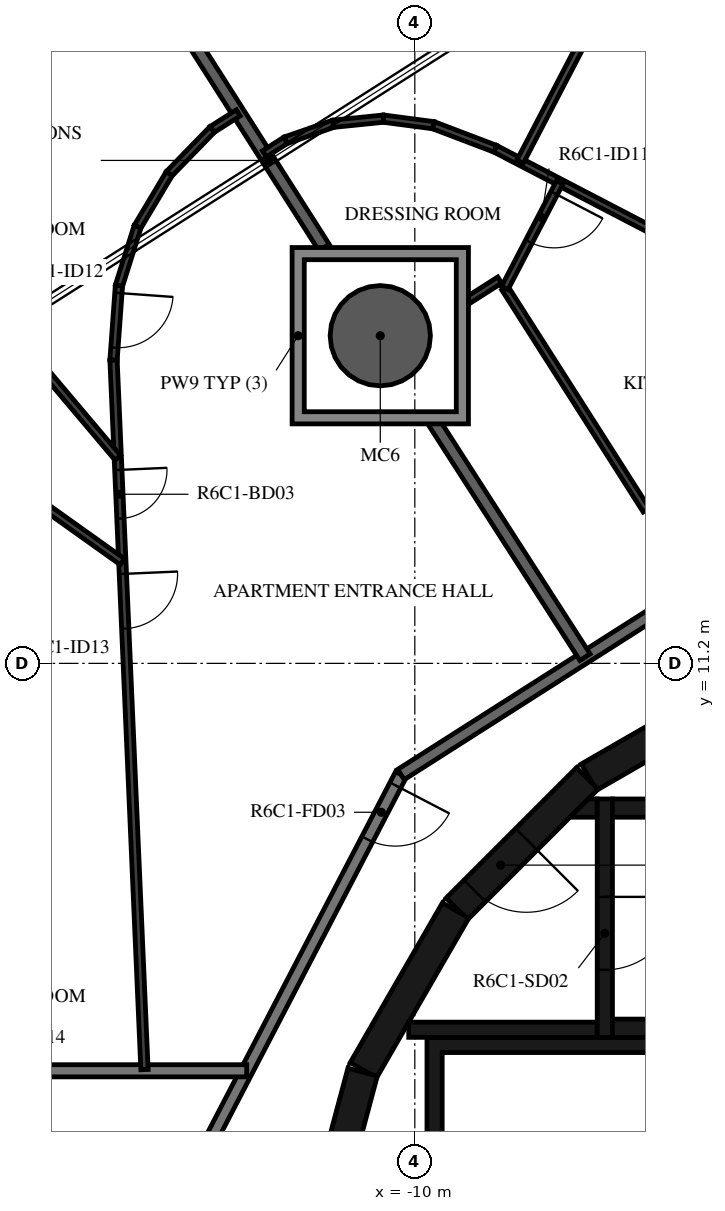
"""IFC4 building model, lengths in metres.
Left out: names, types, materials, properties, quantities, classifications, styles, units other than length and angle.
Written with IfcOpenShell. Run it as: python <this file> out.ifc"""

import sys

from ifc_helpers import new_model, si_unit, direction, frame, frame_2d, origin, origin_2d, place, context, subcontext, project, spatial, polyline, rectangle, hollow_circle, outline, extrude, element, fill, save


model = new_model("IFC4")
c1 = context("Model", 3, precision=1e-05, world=origin(), true_north=direction((0.0, 1.0)))
c2 = subcontext(c1, "Body", "Model", "MODEL_VIEW")
j1 = project(units=[si_unit("LENGTHUNIT", "METRE"), si_unit("PLANEANGLEUNIT", "RADIAN")], contexts=[c1])
p1 = place(None, origin())
s1 = spatial("IfcSite", under=j1, at=p1, CompositionType="ELEMENT")
p2 = place(p1, origin())
s2 = spatial("IfcBuilding", under=s1, at=p2, CompositionType="ELEMENT")
p3 = place(p2, frame((0.0, 0.0, 251.2)))
s3 = spatial("IfcBuildingStorey", under=s2, at=p3, CompositionType="ELEMENT", Elevation=251.2)
p4 = place(p3, frame((-10.568, 16.588, -0.38), z_axis=(0.0, 0.0, 1.0), x_axis=(1.0, 0.0, 0.0)))
e1 = element("IfcColumn", 1, at=p4, inside=s3, PredefinedType="COLUMN", context=c2, shape_type="SweptSolid", body=[
    extrude(hollow_circle(Radius=0.825, WallThickness=0.04, at=origin_2d()), origin(), (0.0, 0.0, 1.0), 3.5),
])
p5 = place(p3, frame((-4.51, 10.845, 0.0), z_axis=(0.0, 0.0, 1.0), x_axis=(-0.865975092491, -0.500087131594, 0.0)))
e2 = element("IfcWall", 2, at=p5, inside=s3, PredefinedType="SHEAR", context=c2, shape_type="SweptSolid", body=[
    extrude(rectangle(XDim=3.033, YDim=0.5, at=frame_2d((1.516, 0.0))), origin(), (0.0, 0.0, 1.0), 3.12),
])
p6 = place(p3, frame((-7.164, 9.308, 0.0), z_axis=(0.0, 0.0, 1.0), x_axis=(-0.707106781187, -0.707106781187, 0.0)))
e3 = element("IfcWall", 3, at=p6, inside=s3, PredefinedType="SHEAR", context=c2, shape_type="SweptSolid", body=[
    extrude(rectangle(XDim=3.032, YDim=0.5, at=frame_2d((1.516, 0.0))), origin(), (0.0, 0.0, 1.0), 3.12),
])
p7 = place(p6, frame((1.416, 0.0, 0.0)))
e4 = element("IfcOpeningElement", 4, at=p7, cuts=e3, PredefinedType="OPENING", context=c2, shape_type="SweptSolid", body=[
    extrude(rectangle(XDim=1.2, YDim=2.1, at=frame_2d((0.6, 1.05))), frame((0.0, 0.26, 0.0), z_axis=(0.0, -1.0, 0.0), x_axis=(1.0, 0.0, 0.0)), (0.0, 0.0, 1.0), 0.52),
])
for number, where, z_axis, x_axis in (
    (5, (-9.329, 7.137, 0.0), (0.0, 0.0, 1.0), (-0.5, -0.866, 0.0)),
    (6, (-10.858, 4.479, 0.0), (0.0, 0.0, 1.0), (-0.259, -0.966, 0.0)),
):
    element("IfcWall", number, at=place(p3, frame(where, z_axis=z_axis, x_axis=x_axis)), inside=s3, PredefinedType="SHEAR", context=c2, shape_type="SweptSolid", body=[
        extrude(rectangle(XDim=3.033, YDim=0.5, at=frame_2d((1.516, 0.0))), origin(), (0.0, 0.0, 1.0), 3.12),
    ])
for number, where, z_axis, x_axis in (
    (7, (-6.75, 5.2, 0.0), (0.0, 0.0, 1.0), (1.0, 0.0, 0.0)),
    (8, (-6.75, 8.82, 0.0), (0.0, 0.0, 1.0), (1.0, 0.0, 0.0)),
):
    element("IfcWall", number, at=place(p3, frame(where, z_axis=z_axis, x_axis=x_axis)), inside=s3, PredefinedType="SHEAR", context=c2, shape_type="SweptSolid", body=[
        extrude(rectangle(XDim=6.75, YDim=0.3, at=frame_2d((3.375, 0.0))), origin(), (0.0, 0.0, 1.0), 3.12),
    ])
p8 = place(p3, frame((-6.875, 8.97, 0.0), z_axis=(0.0, 0.0, 1.0), x_axis=(0.0, -1.0, 0.0)))
e9 = element("IfcWall", 9, at=p8, inside=s3, PredefinedType="SHEAR", context=c2, shape_type="SweptSolid", body=[
    extrude(rectangle(XDim=3.92, YDim=0.25, at=frame_2d((1.96, 0.0))), origin(), (0.0, 0.0, 1.0), 3.12),
])
p9 = place(p8, frame((1.61, 0.0, 0.0)))
e10 = element("IfcOpeningElement", 10, at=p9, cuts=e9, PredefinedType="OPENING", context=c2, shape_type="SweptSolid", body=[
    extrude(rectangle(XDim=1.2, YDim=2.1, at=frame_2d((0.6, 1.05))), frame((0.0, 0.135, 0.0), z_axis=(0.0, -1.0, 0.0), x_axis=(1.0, 0.0, 0.0)), (0.0, 0.0, 1.0), 0.27),
])
p10 = place(p3, frame((-7.0, 5.175, 0.0), z_axis=(0.0, 0.0, 1.0), x_axis=(-1.0, 0.0, 0.0)))
e11 = element("IfcWall", 11, at=p10, inside=s3, PredefinedType="SHEAR", context=c2, shape_type="SweptSolid", body=[
    extrude(rectangle(XDim=3.1, YDim=0.25, at=frame_2d((1.55, 0.0))), origin(), (0.0, 0.0, 1.0), 3.12),
])
p11 = place(p3, origin())
e12 = element("IfcWall", 12, at=p11, inside=s3, PredefinedType="SHEAR", context=c2, shape_type="SweptSolid", body=[
    extrude(outline(polyline([(-7.148, 8.97), (-7.0, 8.97), (-7.0, 8.67), (-7.448, 8.67), (-7.148, 8.97)])), origin(), (0.0, 0.0, 1.0), 3.12),
])
p12 = place(p3, origin())
e13 = element("IfcWall", 13, at=p12, inside=s3, PredefinedType="SHEAR", context=c2, shape_type="SweptSolid", body=[
    extrude(outline(polyline([(-9.55, 4.8), (-1.2, 4.8), (-1.2, 1.9), (-0.95, 1.9), (-0.95, 4.8), (0.95, 4.8), (0.95, 1.9), (1.2, 1.9), (1.2, 4.8), (3.1, 4.8), (3.1, 1.9), (3.35, 1.9), (3.35, 4.8), (5.25, 4.8), (5.25, 1.9), (5.5, 1.9), (5.5, 4.8), (7.4, 4.8), (7.4, 1.9), (7.65, 1.9), (7.65, 4.8), (9.55, 4.8), (9.55, 1.9), (9.8, 1.9), (9.8, 4.8), (9.8, 5.05), (-9.8, 5.05), (-9.8, 4.8), (-9.8, 1.9), (-9.55, 1.9), (-9.55, 4.8)])), origin(), (0.0, 0.0, 1.0), 3.12),
])
p13 = place(p3, frame((-10.228, 9.372, 0.0), z_axis=(0.0, 0.0, 1.0), x_axis=(-0.461759464021, -0.887005184532, 0.0)))
e14 = element("IfcWall", 14, at=p13, inside=s3, PredefinedType="STANDARD", context=c2, shape_type="SweptSolid", body=[
    extrude(rectangle(XDim=7.181, YDim=0.2, at=frame_2d((3.591, 0.0))), origin(), (0.0, 0.0, 1.0), 3.12),
])
p14 = place(p13, frame((0.2, 0.0, 0.0)))
e15 = element("IfcOpeningElement", 15, at=p14, cuts=e14, PredefinedType="OPENING", context=c2, shape_type="SweptSolid", body=[
    extrude(rectangle(XDim=1.0, YDim=2.1, at=frame_2d((0.5, 1.05))), frame((0.0, 0.11, 0.0), z_axis=(0.0, -1.0, 0.0), x_axis=(1.0, 0.0, 0.0)), (0.0, 0.0, 1.0), 0.22),
])
p15 = place(p3, frame((-4.172, 13.231, 0.0), z_axis=(0.0, 0.0, 1.0), x_axis=(-0.843388394728, -0.537304397561, 0.0)))
e16 = element("IfcWall", 16, at=p15, inside=s3, PredefinedType="STANDARD", context=c2, shape_type="SweptSolid", body=[
    extrude(rectangle(XDim=7.181, YDim=0.2, at=frame_2d((3.59, 0.0))), origin(), (0.0, 0.0, 1.0), 3.12),
])
p16 = place(p3, frame((-12.764, 4.5, 0.0), z_axis=(0.0, 0.0, 1.0), x_axis=(-1.0, 0.0, 0.0)))
e17 = element("IfcWall", 17, at=p16, inside=s3, PredefinedType="STANDARD", context=c2, shape_type="SweptSolid", body=[
    extrude(rectangle(XDim=4.086, YDim=0.2, at=frame_2d((2.043, 0.0))), origin(), (0.0, 0.0, 1.0), 3.12),
])
p17 = place(p3, frame((-9.69, 15.171, 0.0), z_axis=(0.0, 0.0, 1.0), x_axis=(0.540961372678, -0.841047438181, 0.0)))
e18 = element("IfcWall", 18, at=p17, inside=s3, PredefinedType="STANDARD", context=c2, shape_type="SweptSolid", body=[
    extrude(rectangle(XDim=4.602, YDim=0.2, at=frame_2d((2.301, 0.0))), origin(), (0.0, 0.0, 1.0), 3.12),
])
p18 = place(p3, frame((-14.837, 23.29, 0.0), z_axis=(0.0, 0.0, 1.0), x_axis=(0.537316863221, -0.843380452998, 0.0)))
e19 = element("IfcWall", 19, at=p18, inside=s3, PredefinedType="STANDARD", context=c2, shape_type="SweptSolid", body=[
    extrude(rectangle(XDim=6.227, YDim=0.2, at=frame_2d((3.113, 0.0))), origin(), (0.0, 0.0, 1.0), 3.12),
])
p19 = place(p3, frame((-4.888, 14.553, 0.0), z_axis=(0.0, 0.0, 1.0), x_axis=(-0.843349608892, -0.537365273517, 0.0)))
e20 = element("IfcWall", 20, at=p19, inside=s3, PredefinedType="PARTITIONING", context=c2, shape_type="SweptSolid", body=[
    extrude(rectangle(XDim=1.548, YDim=0.12, at=frame_2d((0.774, 0.0))), origin(), (0.0, 0.0, 1.0), 3.12),
])
p20 = place(p19, frame((0.2, 0.0, 0.0)))
e21 = element("IfcOpeningElement", 21, at=p20, cuts=e20, PredefinedType="OPENING", context=c2, shape_type="SweptSolid", body=[
    extrude(rectangle(XDim=0.9, YDim=2.1, at=frame_2d((0.45, 1.05))), frame((0.0, 0.07, 0.0), z_axis=(0.0, -1.0, 0.0), x_axis=(1.0, 0.0, 0.0)), (0.0, 0.0, 1.0), 0.14),
])
p21 = place(p3, frame((-6.194, 13.721, 0.0), z_axis=(0.0, 0.0, 1.0), x_axis=(-0.537316807294, 0.843380488629, 0.0)))
e22 = element("IfcWall", 22, at=p21, inside=s3, PredefinedType="PARTITIONING", context=c2, shape_type="SweptSolid", body=[
    extrude(rectangle(XDim=4.331, YDim=0.12, at=frame_2d((2.165, 0.0))), origin(), (0.0, 0.0, 1.0), 3.12),
])
p22 = place(p3, frame((-8.604, 17.504, 0.0), z_axis=(0.0, 0.0, 1.0), x_axis=(-0.843265746233, -0.537496866251, 0.0)))
e23 = element("IfcWall", 23, at=p22, inside=s3, PredefinedType="PARTITIONING", context=c2, shape_type="SweptSolid", body=[
    extrude(rectangle(XDim=0.61, YDim=0.12, at=frame_2d((0.305, 0.0))), origin(), (0.0, 0.0, 1.0), 3.12),
])
p23 = place(p3, frame((0.41, 14.932, 0.0), z_axis=(0.0, 0.0, 1.0), x_axis=(-0.887012293034, 0.461745808867, 0.0)))
e24 = element("IfcWall", 24, at=p23, inside=s3, PredefinedType="PARTITIONING", context=c2, shape_type="SweptSolid", body=[
    extrude(rectangle(XDim=10.246, YDim=0.12, at=frame_2d((5.123, 0.0))), origin(), (0.0, 0.0, 1.0), 3.12),
])
p24 = place(p23, frame((4.725, 0.0, 0.0)))
e25 = element("IfcOpeningElement", 25, at=p24, cuts=e24, PredefinedType="OPENING", context=c2, shape_type="SweptSolid", body=[
    extrude(rectangle(XDim=0.9, YDim=2.1, at=frame_2d((0.45, 1.05))), frame((0.0, 0.07, 0.0), z_axis=(0.0, -1.0, 0.0), x_axis=(1.0, 0.0, 0.0)), (0.0, 0.0, 1.0), 0.14),
])
p25 = place(p3, frame((-6.237, 23.353, 0.0), z_axis=(0.0, 0.0, 1.0), x_axis=(-0.461714347673, -0.88702866986, 0.0)))
e26 = element("IfcWall", 26, at=p25, inside=s3, PredefinedType="PARTITIONING", context=c2, shape_type="SweptSolid", body=[
    extrude(rectangle(XDim=4.4, YDim=0.12, at=frame_2d((2.2, 0.0))), origin(), (0.0, 0.0, 1.0), 2.73),
])
p26 = place(p25, frame((0.2, 0.0, 0.0)))
e27 = element("IfcOpeningElement", 27, at=p26, cuts=e26, PredefinedType="OPENING", context=c2, shape_type="SweptSolid", body=[
    extrude(rectangle(XDim=0.9, YDim=2.1, at=frame_2d((0.45, 1.05))), frame((0.0, 0.07, 0.0), z_axis=(0.0, -1.0, 0.0), x_axis=(1.0, 0.0, 0.0)), (0.0, 0.0, 1.0), 0.14),
])
p27 = place(p3, frame((-7.616, 19.11, 0.0), z_axis=(0.0, 0.0, 1.0), x_axis=(-0.461764840073, -0.887002385832, 0.0)))
e28 = element("IfcWall", 28, at=p27, inside=s3, PredefinedType="PARTITIONING", context=c2, shape_type="SweptSolid", body=[
    extrude(rectangle(XDim=1.958, YDim=0.12, at=frame_2d((0.979, 0.0))), origin(), (0.0, 0.0, 1.0), 3.12),
])
p28 = place(p27, frame((0.2, 0.0, 0.0)))
e29 = element("IfcOpeningElement", 29, at=p28, cuts=e28, PredefinedType="OPENING", context=c2, shape_type="SweptSolid", body=[
    extrude(rectangle(XDim=0.9, YDim=2.1, at=frame_2d((0.45, 1.05))), frame((0.0, 0.07, 0.0), z_axis=(0.0, -1.0, 0.0), x_axis=(1.0, 0.0, 0.0)), (0.0, 0.0, 1.0), 0.14),
])
p29 = place(p3, frame((-12.473, 19.579, 0.0), z_axis=(0.0, 0.0, 1.0), x_axis=(0.843467404643, 0.537180358264, 0.0)))
e30 = element("IfcWall", 30, at=p29, inside=s3, PredefinedType="PARTITIONING", context=c2, shape_type="SweptSolid", body=[
    extrude(rectangle(XDim=0.415, YDim=0.12, at=frame_2d((0.207, 0.0))), origin(), (0.0, 0.0, 1.0), 3.12),
])
for number, where, z_axis, x_axis in (
    (31, (-12.124, 19.802, 0.0), (0.0, 0.0, 1.0), (0.945, 0.328, 0.0)),
    (32, (-11.341, 20.074, 0.0), (0.0, 0.0, 1.0), (0.995, 0.102, 0.0)),
    (33, (-10.516, 20.158, 0.0), (0.0, 0.0, 1.0), (0.991, -0.131, 0.0)),
):
    element("IfcWall", number, at=place(p3, frame(where, z_axis=z_axis, x_axis=x_axis)), inside=s3, PredefinedType="PARTITIONING", context=c2, shape_type="SweptSolid", body=[
        extrude(rectangle(XDim=0.829, YDim=0.12, at=frame_2d((0.415, 0.0))), origin(), (0.0, 0.0, 1.0), 3.12),
    ])
p30 = place(p3, frame((-9.694, 20.05, 0.0), z_axis=(0.0, 0.0, 1.0), x_axis=(0.934647766222, -0.35557496129, 0.0)))
e34 = element("IfcWall", 34, at=p30, inside=s3, PredefinedType="PARTITIONING", context=c2, shape_type="SweptSolid", body=[
    extrude(rectangle(XDim=1.087, YDim=0.12, at=frame_2d((0.543, 0.0))), origin(), (0.0, 0.0, 1.0), 3.12),
])
p31 = place(p3, frame((-12.903, 20.254, 0.0), z_axis=(0.0, 0.0, 1.0), x_axis=(-0.843404143432, -0.537279676557, 0.0)))
e35 = element("IfcWall", 35, at=p31, inside=s3, PredefinedType="PARTITIONING", context=c2, shape_type="SweptSolid", body=[
    extrude(rectangle(XDim=0.508, YDim=0.12, at=frame_2d((0.254, 0.0))), origin(), (0.0, 0.0, 1.0), 3.12),
])
for number, where, z_axis, x_axis in (
    (36, (-13.332, 19.981, 0.0), (0.0, 0.0, 1.0), (-0.697, -0.717, 0.0)),
    (37, (-14.039, 19.252, 0.0), (0.0, 0.0, 1.0), (-0.513, -0.859, 0.0)),
    (38, (-14.56, 18.38, 0.0), (0.0, 0.0, 1.0), (-0.301, -0.954, 0.0)),
):
    element("IfcWall", number, at=place(p3, frame(where, z_axis=z_axis, x_axis=x_axis)), inside=s3, PredefinedType="PARTITIONING", context=c2, shape_type="SweptSolid", body=[
        extrude(rectangle(XDim=1.016, YDim=0.12, at=frame_2d((0.508, 0.0))), origin(), (0.0, 0.0, 1.0), 3.12),
    ])
p32 = place(p3, frame((-14.865, 17.411, 0.0), z_axis=(0.0, 0.0, 1.0), x_axis=(-0.072618457011, -0.997359794508, 0.0)))
e39 = element("IfcWall", 39, at=p32, inside=s3, PredefinedType="PARTITIONING", context=c2, shape_type="SweptSolid", body=[
    extrude(rectangle(XDim=1.227, YDim=0.12, at=frame_2d((0.614, 0.0))), origin(), (0.0, 0.0, 1.0), 3.12),
])
p33 = place(p32, frame((0.12, 0.0, 0.0)))
e40 = element("IfcOpeningElement", 40, at=p33, cuts=e39, PredefinedType="OPENING", context=c2, shape_type="SweptSolid", body=[
    extrude(rectangle(XDim=0.9, YDim=2.1, at=frame_2d((0.45, 1.05))), frame((0.0, 0.07, 0.0), z_axis=(0.0, -1.0, 0.0), x_axis=(1.0, 0.0, 0.0)), (0.0, 0.0, 1.0), 0.14),
])
p34 = place(p3, frame((-14.955, 16.187, 0.0), z_axis=(0.0, 0.0, 1.0), x_axis=(0.04360777668, -0.999048728448, 0.0)))
e41 = element("IfcWall", 41, at=p34, inside=s3, PredefinedType="PARTITIONING", context=c2, shape_type="SweptSolid", body=[
    extrude(rectangle(XDim=11.679, YDim=0.12, at=frame_2d((5.839, 0.0))), origin(), (0.0, 0.0, 1.0), 3.12),
])
p35 = place(p34, frame((1.808, 0.0, 0.0)))
e42 = element("IfcOpeningElement", 42, at=p35, cuts=e41, PredefinedType="OPENING", context=c2, shape_type="SweptSolid", body=[
    extrude(rectangle(XDim=0.8, YDim=2.1, at=frame_2d((0.4, 1.05))), frame((0.0, 0.07, 0.0), z_axis=(0.0, -1.0, 0.0), x_axis=(1.0, 0.0, 0.0)), (0.0, 0.0, 1.0), 0.14),
])
p36 = place(p34, frame((3.519, 0.0, 0.0)))
e43 = element("IfcOpeningElement", 43, at=p36, cuts=e41, PredefinedType="OPENING", context=c2, shape_type="SweptSolid", body=[
    extrude(rectangle(XDim=0.9, YDim=2.1, at=frame_2d((0.45, 1.05))), frame((0.0, 0.07, 0.0), z_axis=(0.0, -1.0, 0.0), x_axis=(1.0, 0.0, 0.0)), (0.0, 0.0, 1.0), 0.14),
])
p37 = place(p3, frame((-18.269, 18.589, 0.0), z_axis=(0.0, 0.0, 1.0), x_axis=(0.645124067673, -0.764077834588, 0.0)))
e44 = element("IfcWall", 44, at=p37, inside=s3, PredefinedType="PARTITIONING", context=c2, shape_type="SweptSolid", body=[
    extrude(rectangle(XDim=5.246, YDim=0.12, at=frame_2d((2.623, 0.0))), origin(), (0.0, 0.0, 1.0), 3.12),
])
p38 = place(p3, frame((-18.529, 15.522, 0.0), z_axis=(0.0, 0.0, 1.0), x_axis=(0.814350646776, -0.580373176582, 0.0)))
e45 = element("IfcWall", 45, at=p38, inside=s3, PredefinedType="PARTITIONING", context=c2, shape_type="SweptSolid", body=[
    extrude(rectangle(XDim=4.567, YDim=0.12, at=frame_2d((2.284, 0.0))), origin(), (0.0, 0.0, 1.0), 3.12),
])
p39 = place(p3, origin())
e46 = element("IfcWall", 46, at=p39, inside=s3, PredefinedType="STANDARD", context=c2, shape_type="SweptSolid", body=[
    extrude(outline(polyline([(-9.118, 18.038), (-9.118, 15.138), (-12.018, 15.138), (-12.018, 18.038), (-9.118, 18.038)]), holes=[polyline([(-11.818, 15.338), (-9.318, 15.338), (-9.318, 17.838), (-11.818, 17.838), (-11.818, 15.338)])]), origin(), (0.0, 0.0, 1.0), 3.12),
])
p40 = place(p9, origin())
e47 = element("IfcDoor", 47, at=p40, inside=s3, OperationType="SINGLE_SWING_LEFT", PredefinedType="DOOR", context=c2, shape_type="SweptSolid", body=[
    extrude(rectangle(XDim=1.2, YDim=2.1, at=frame_2d((0.6, 1.05))), frame((0.0, 0.025, 0.0), z_axis=(0.0, -1.0, 0.0), x_axis=(1.0, 0.0, 0.0)), (0.0, 0.0, 1.0), 0.05),
])
fill(e10, e47)
p41 = place(p7, origin())
e48 = element("IfcDoor", 48, at=p41, inside=s3, OperationType="SINGLE_SWING_RIGHT", PredefinedType="DOOR", context=c2, shape_type="SweptSolid", body=[
    extrude(rectangle(XDim=1.2, YDim=2.1, at=frame_2d((0.6, 1.05))), frame((0.0, 0.025, 0.0), z_axis=(0.0, -1.0, 0.0), x_axis=(1.0, 0.0, 0.0)), (0.0, 0.0, 1.0), 0.05),
])
fill(e4, e48)
p42 = place(p28, origin())
e49 = element("IfcDoor", 49, at=p42, inside=s3, OperationType="SINGLE_SWING_RIGHT", PredefinedType="DOOR", context=c2, shape_type="SweptSolid", body=[
    extrude(rectangle(XDim=0.9, YDim=2.1, at=frame_2d((0.45, 1.05))), frame((0.0, 0.025, 0.0), z_axis=(0.0, -1.0, 0.0), x_axis=(1.0, 0.0, 0.0)), (0.0, 0.0, 1.0), 0.05),
])
fill(e29, e49)
p43 = place(p14, origin())
e50 = element("IfcDoor", 50, at=p43, inside=s3, OperationType="SINGLE_SWING_LEFT", PredefinedType="DOOR", context=c2, shape_type="SweptSolid", body=[
    extrude(rectangle(XDim=1.0, YDim=2.1, at=frame_2d((0.5, 1.05))), frame((0.0, 0.025, 0.0), z_axis=(0.0, -1.0, 0.0), x_axis=(1.0, 0.0, 0.0)), (0.0, 0.0, 1.0), 0.05),
])
fill(e15, e50)
p44 = place(p33, origin())
e51 = element("IfcDoor", 51, at=p44, inside=s3, OperationType="SINGLE_SWING_LEFT", PredefinedType="DOOR", context=c2, shape_type="SweptSolid", body=[
    extrude(rectangle(XDim=0.9, YDim=2.1, at=frame_2d((0.45, 1.05))), frame((0.0, 0.025, 0.0), z_axis=(0.0, -1.0, 0.0), x_axis=(1.0, 0.0, 0.0)), (0.0, 0.0, 1.0), 0.05),
])
fill(e40, e51)
p45 = place(p35, origin())
e52 = element("IfcDoor", 52, at=p45, inside=s3, OperationType="SINGLE_SWING_LEFT", PredefinedType="DOOR", context=c2, shape_type="SweptSolid", body=[
    extrude(rectangle(XDim=0.8, YDim=2.1, at=frame_2d((0.4, 1.05))), frame((0.0, 0.025, 0.0), z_axis=(0.0, -1.0, 0.0), x_axis=(1.0, 0.0, 0.0)), (0.0, 0.0, 1.0), 0.05),
])
fill(e42, e52)
p46 = place(p36, origin())
e53 = element("IfcDoor", 53, at=p46, inside=s3, OperationType="SINGLE_SWING_LEFT", PredefinedType="DOOR", context=c2, shape_type="SweptSolid", body=[
    extrude(rectangle(XDim=0.9, YDim=2.1, at=frame_2d((0.45, 1.05))), frame((0.0, 0.025, 0.0), z_axis=(0.0, -1.0, 0.0), x_axis=(1.0, 0.0, 0.0)), (0.0, 0.0, 1.0), 0.05),
])
fill(e43, e53)
save(model, sys.argv[1])
